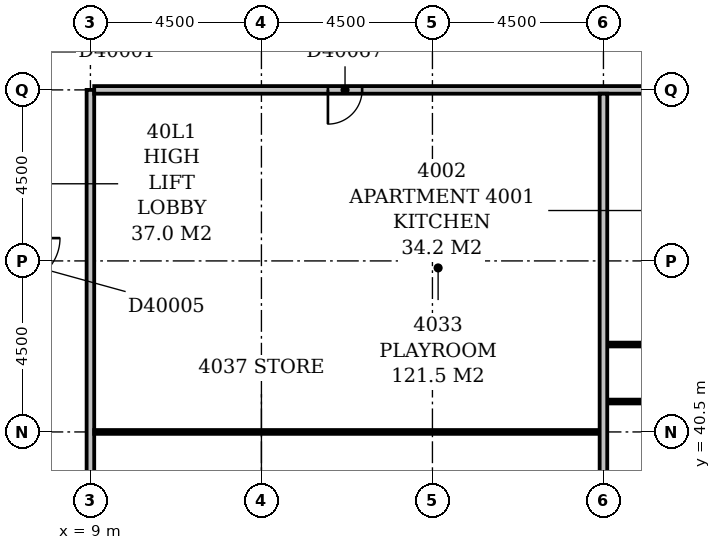
"""IFC4 building model, lengths in metres.
Left out: names, types, materials, properties, quantities, classifications, styles, units other than length and angle.
Written with IfcOpenShell. Run it as: python <this file> out.ifc"""

import sys

from ifc_helpers import new_model, si_unit, direction, frame, frame_2d, origin, place, context, subcontext, project, spatial, rectangle, extrude, element, fill, save


model = new_model("IFC4")
c1 = context("Model", 3, precision=1e-05, world=origin(), true_north=direction((0.0, 1.0)))
c2 = subcontext(c1, "Body", "Model", "MODEL_VIEW")
j1 = project(units=[si_unit("LENGTHUNIT", "METRE"), si_unit("PLANEANGLEUNIT", "RADIAN")], contexts=[c1])
p1 = place(None, origin())
s1 = spatial("IfcSite", under=j1, at=p1, CompositionType="ELEMENT")
p2 = place(p1, origin())
s2 = spatial("IfcBuilding", under=s1, at=p2, CompositionType="ELEMENT")
p3 = place(p2, frame((0.0, 0.0, 159.2)))
s3 = spatial("IfcBuildingStorey", under=s2, at=p3, CompositionType="ELEMENT", Elevation=159.2)
p4 = place(p3, frame((9.0, 34.75, 0.0), z_axis=(0.0, 0.0, 1.0), x_axis=(0.0, 1.0, 0.0)))
e1 = element("IfcWall", 1, at=p4, inside=s3, PredefinedType="PARTITIONING", context=c2, shape_type="SweptSolid", body=[
    extrude(rectangle(XDim=14.75, YDim=0.2, at=frame_2d((7.375, 0.0))), origin(), (0.0, 0.0, 1.0), 3.3),
])
p5 = place(p4, frame((3.0, 0.0, 0.0)))
e2 = element("IfcOpeningElement", 2, at=p5, cuts=e1, PredefinedType="OPENING", context=c2, shape_type="SweptSolid", body=[
    extrude(rectangle(XDim=0.9, YDim=2.1, at=frame_2d((0.45, 1.05))), frame((0.0, 0.112, 0.0), z_axis=(0.0, -1.0, 0.0), x_axis=(1.0, 0.0, 0.0)), (0.0, 0.0, 1.0), 0.224),
])
p6 = place(p3, frame((22.5, 36.5, 0.0), z_axis=(0.0, 0.0, 1.0), x_axis=(0.0, 1.0, 0.0)))
e3 = element("IfcWall", 3, at=p6, inside=s3, PredefinedType="PARTITIONING", context=c2, shape_type="SweptSolid", body=[
    extrude(rectangle(XDim=12.9, YDim=0.2, at=frame_2d((6.45, 0.0))), origin(), (0.0, 0.0, 1.0), 3.3),
])
p7 = place(p3, frame((9.1, 40.5, 0.0), z_axis=(0.0, 0.0, 1.0), x_axis=(1.0, 0.0, 0.0)))
e4 = element("IfcWall", 4, at=p7, inside=s3, PredefinedType="PARTITIONING", context=c2, shape_type="SweptSolid", body=[
    extrude(rectangle(XDim=13.3, YDim=0.1, at=frame_2d((6.65, 0.0))), origin(), (0.0, 0.0, 1.0), 3.3),
])
p8 = place(p3, frame((22.6, 41.3, 0.0), z_axis=(0.0, 0.0, 1.0), x_axis=(1.0, 0.0, 0.0)))
e5 = element("IfcWall", 5, at=p8, inside=s3, PredefinedType="PARTITIONING", context=c2, shape_type="SweptSolid", body=[
    extrude(rectangle(XDim=17.8, YDim=0.1, at=frame_2d((8.9, 0.0))), origin(), (0.0, 0.0, 1.0), 3.3),
])
p9 = place(p8, frame((3.9, 0.0, 0.0)))
e6 = element("IfcOpeningElement", 6, at=p9, cuts=e5, PredefinedType="OPENING", context=c2, shape_type="SweptSolid", body=[
    extrude(rectangle(XDim=0.9, YDim=2.1, at=frame_2d((0.45, 1.05))), frame((0.0, 0.062, 0.0), z_axis=(0.0, -1.0, 0.0), x_axis=(1.0, 0.0, 0.0)), (0.0, 0.0, 1.0), 0.124),
])
p10 = place(p8, frame((10.7, 0.0, 0.0)))
e7 = element("IfcOpeningElement", 7, at=p10, cuts=e5, PredefinedType="OPENING", context=c2, shape_type="SweptSolid", body=[
    extrude(rectangle(XDim=0.9, YDim=2.1, at=frame_2d((0.45, 1.05))), frame((0.0, 0.062, 0.0), z_axis=(0.0, -1.0, 0.0), x_axis=(1.0, 0.0, 0.0)), (0.0, 0.0, 1.0), 0.124),
])
p11 = place(p8, frame((14.05, 0.0, 0.0)))
e8 = element("IfcOpeningElement", 8, at=p11, cuts=e5, PredefinedType="OPENING", context=c2, shape_type="SweptSolid", body=[
    extrude(rectangle(XDim=0.9, YDim=2.1, at=frame_2d((0.45, 1.05))), frame((0.0, 0.062, 0.0), z_axis=(0.0, -1.0, 0.0), x_axis=(1.0, 0.0, 0.0)), (0.0, 0.0, 1.0), 0.124),
])
p12 = place(p3, frame((22.6, 42.8, 0.0), z_axis=(0.0, 0.0, 1.0), x_axis=(1.0, 0.0, 0.0)))
e9 = element("IfcWall", 9, at=p12, inside=s3, PredefinedType="PARTITIONING", context=c2, shape_type="SweptSolid", body=[
    extrude(rectangle(XDim=4.95, YDim=0.1, at=frame_2d((2.475, 0.0))), origin(), (0.0, 0.0, 1.0), 3.3),
])
p13 = place(p12, frame((2.0, 0.0, 0.0)))
e10 = element("IfcOpeningElement", 10, at=p13, cuts=e9, PredefinedType="OPENING", context=c2, shape_type="SweptSolid", body=[
    extrude(rectangle(XDim=0.9, YDim=2.1, at=frame_2d((0.45, 1.05))), frame((0.0, 0.062, 0.0), z_axis=(0.0, -1.0, 0.0), x_axis=(1.0, 0.0, 0.0)), (0.0, 0.0, 1.0), 0.124),
])
p14 = place(p3, frame((9.1, 49.5, 0.0), z_axis=(0.0, 0.0, 1.0), x_axis=(1.0, 0.0, 0.0)))
e11 = element("IfcWall", 11, at=p14, inside=s3, PredefinedType="PARTITIONING", context=c2, shape_type="SweptSolid", body=[
    extrude(rectangle(XDim=32.55, YDim=0.2, at=frame_2d((16.275, 0.0))), origin(), (0.0, 0.0, 1.0), 3.3),
])
p15 = place(p14, frame((18.8, 0.0, 0.0)))
e12 = element("IfcOpeningElement", 12, at=p15, cuts=e11, PredefinedType="OPENING", context=c2, shape_type="SweptSolid", body=[
    extrude(rectangle(XDim=1.0, YDim=2.1, at=frame_2d((0.5, 1.05))), frame((0.0, 0.112, 0.0), z_axis=(0.0, -1.0, 0.0), x_axis=(1.0, 0.0, 0.0)), (0.0, 0.0, 1.0), 0.224),
])
p16 = place(p14, frame((6.15, 0.0, 0.0)))
e13 = element("IfcOpeningElement", 13, at=p16, cuts=e11, PredefinedType="OPENING", context=c2, shape_type="SweptSolid", body=[
    extrude(rectangle(XDim=0.9, YDim=2.1, at=frame_2d((0.45, 1.05))), frame((0.0, 0.112, 0.0), z_axis=(0.0, -1.0, 0.0), x_axis=(1.0, 0.0, 0.0)), (0.0, 0.0, 1.0), 0.224),
])
p17 = place(p16, frame((0.9, 0.0, 0.0), z_axis=(0.0, 0.0, 1.0), x_axis=(-1.0, 0.0, 0.0)))
e14 = element("IfcDoor", 14, at=p17, inside=s3, OperationType="SINGLE_SWING_RIGHT", PredefinedType="DOOR", context=c2, shape_type="SweptSolid", body=[
    extrude(rectangle(XDim=0.9, YDim=2.1, at=frame_2d((0.45, 1.05))), frame((0.0, 0.025, 0.0), z_axis=(0.0, -1.0, 0.0), x_axis=(1.0, 0.0, 0.0)), (0.0, 0.0, 1.0), 0.05),
])
fill(e13, e14)
save(model, sys.argv[1])
